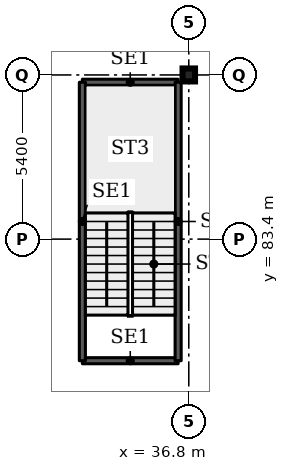
"""IFC4 building model, lengths in metres.
Left out: names, types, materials, properties, quantities, classifications, styles, units other than length and angle.
Written with IfcOpenShell. Run it as: python <this file> out.ifc"""

import sys

from ifc_helpers import new_model, si_unit, direction, frame, frame_2d, origin, origin_2d, place, context, subcontext, project, spatial, rectangle, i_section, extrude, element, save


model = new_model("IFC4")
c1 = context("Model", 3, precision=1e-05, world=origin(), true_north=direction((0.0, 1.0)))
c2 = subcontext(c1, "Body", "Model", "MODEL_VIEW")
j1 = project(units=[si_unit("LENGTHUNIT", "METRE"), si_unit("PLANEANGLEUNIT", "RADIAN")], contexts=[c1])
p1 = place(None, origin())
s1 = spatial("IfcSite", under=j1, at=p1, CompositionType="ELEMENT")
p2 = place(p1, origin())
s2 = spatial("IfcBuilding", under=s1, at=p2, CompositionType="ELEMENT")
p3 = place(p2, frame((0.0, 0.0, 26.0)))
s3 = spatial("IfcBuildingStorey", under=s2, at=p3, CompositionType="ELEMENT", Elevation=26.0)
p4 = place(p3, frame((36.8, 88.8, 0.0), z_axis=(0.0, 0.0, 1.0), x_axis=(1.0, 0.0, 0.0)))
e1 = element("IfcColumn", 1, at=p4, inside=s3, PredefinedType="COLUMN", context=c2, shape_type="SweptSolid", body=[
    extrude(i_section(OverallWidth=0.409, OverallDepth=0.425, WebThickness=0.033, FlangeThickness=0.052, FilletRadius=0.013, at=origin_2d()), origin(), (0.0, 0.0, 1.0), 4.5),
])
for number, where, z_axis, x_axis in (
    (2, (33.3, 79.4, 0.0), (0.0, 0.0, 1.0), (1.0, 0.0, 0.0)),
    (3, (33.3, 88.56, 0.0), (0.0, 0.0, 1.0), (1.0, 0.0, 0.0)),
):
    element("IfcWall", number, at=place(p3, frame(where, z_axis=z_axis, x_axis=x_axis)), inside=s3, PredefinedType="SHEAR", context=c2, shape_type="SweptSolid", body=[
        extrude(rectangle(XDim=3.15, YDim=0.2, at=frame_2d((1.575, 0.0))), origin(), (0.0, 0.0, 1.0), 4.5),
    ])
for number, where, z_axis, x_axis in (
    (4, (33.3, 79.4, 0.0), (0.0, 0.0, 1.0), (0.0, 1.0, 0.0)),
    (5, (36.45, 79.4, 0.0), (0.0, 0.0, 1.0), (0.0, 1.0, 0.0)),
):
    element("IfcWall", number, at=place(p3, frame(where, z_axis=z_axis, x_axis=x_axis)), inside=s3, PredefinedType="SHEAR", context=c2, shape_type="SweptSolid", body=[
        extrude(rectangle(XDim=9.16, YDim=0.2, at=frame_2d((4.58, 0.0))), origin(), (0.0, 0.0, 1.0), 4.5),
    ])
save(model, sys.argv[1])
